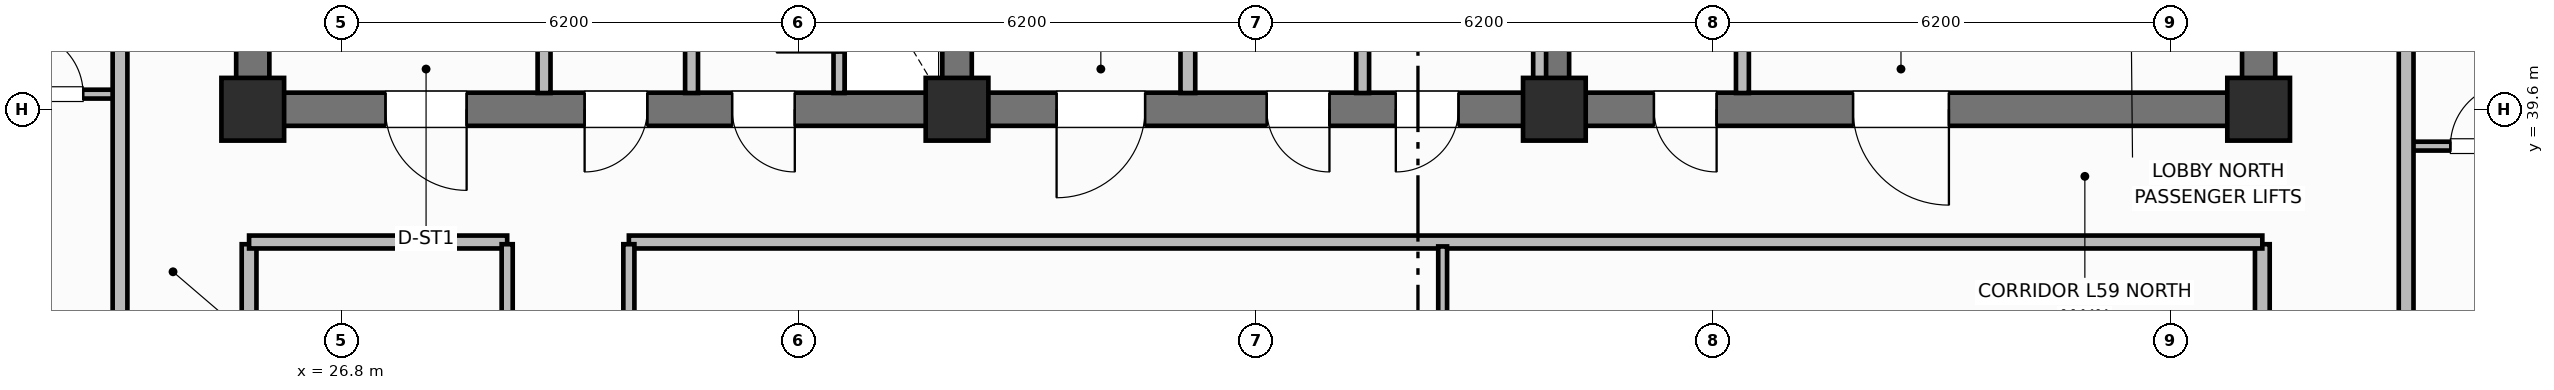
"""IFC4 building model, lengths in metres.
Left out: names, types, materials, properties, quantities, classifications, styles, units other than length and angle.
Written with IfcOpenShell. Run it as: python <this file> out.ifc"""

import sys

from ifc_helpers import new_model, si_unit, direction, frame, frame_2d, origin, origin_2d, place, context, subcontext, project, spatial, rectangle, extrude, element, fill, save


model = new_model("IFC4")
c1 = context("Model", 3, precision=1e-05, world=origin(), true_north=direction((0.0, 1.0)))
c2 = subcontext(c1, "Body", "Model", "MODEL_VIEW")
j1 = project(units=[si_unit("LENGTHUNIT", "METRE"), si_unit("PLANEANGLEUNIT", "RADIAN")], contexts=[c1])
p1 = place(None, origin())
s1 = spatial("IfcSite", under=j1, at=p1, CompositionType="ELEMENT")
p2 = place(p1, origin())
s2 = spatial("IfcBuilding", under=s1, at=p2, CompositionType="ELEMENT")
p3 = place(p2, frame((0.0, 0.0, 236.9)))
s3 = spatial("IfcBuildingStorey", under=s2, at=p3, CompositionType="ELEMENT", Elevation=236.9)
for number, where, z_axis, x_axis in (
    (1, (25.6, 39.825, 0.0), (0.0, 0.0, 1.0), (0.0, 1.0, 0.0)),
    (2, (52.8, 39.825, 0.0), (0.0, 0.0, 1.0), (0.0, 1.0, 0.0)),
):
    element("IfcWall", number, at=place(p3, frame(where, z_axis=z_axis, x_axis=x_axis)), inside=s3, PredefinedType="SHEAR", context=c2, shape_type="SweptSolid", body=[
        extrude(rectangle(XDim=5.75, YDim=0.45, at=frame_2d((2.875, 0.0))), origin(), (0.0, 0.0, 1.0), 3.7),
    ])
p4 = place(p3, frame((52.8, 39.6, 0.0), z_axis=(0.0, 0.0, 1.0), x_axis=(-1.0, 0.0, 0.0)))
e3 = element("IfcWall", 3, at=p4, inside=s3, PredefinedType="SHEAR", context=c2, shape_type="SweptSolid", body=[
    extrude(rectangle(XDim=27.2, YDim=0.45, at=frame_2d((13.6, 0.0))), origin(), (0.0, 0.0, 1.0), 3.7),
])
p5 = place(p4, frame((24.3, 0.0, 0.0)))
e4 = element("IfcOpeningElement", 4, at=p5, cuts=e3, PredefinedType="OPENING", context=c2, shape_type="SweptSolid", body=[
    extrude(rectangle(XDim=1.1, YDim=2.15, at=frame_2d((0.55, 1.075))), frame((0.0, 0.235, 0.0), z_axis=(0.0, -1.0, 0.0), x_axis=(1.0, 0.0, 0.0)), (0.0, 0.0, 1.0), 0.47),
])
p6 = place(p4, frame((21.85, 0.0, 0.0)))
e5 = element("IfcOpeningElement", 5, at=p6, cuts=e3, PredefinedType="OPENING", context=c2, shape_type="SweptSolid", body=[
    extrude(rectangle(XDim=0.85, YDim=2.1, at=frame_2d((0.425, 1.05))), frame((0.0, 0.235, 0.0), z_axis=(0.0, -1.0, 0.0), x_axis=(1.0, 0.0, 0.0)), (0.0, 0.0, 1.0), 0.47),
])
p7 = place(p4, frame((19.85, 0.0, 0.0)))
e6 = element("IfcOpeningElement", 6, at=p7, cuts=e3, PredefinedType="OPENING", context=c2, shape_type="SweptSolid", body=[
    extrude(rectangle(XDim=0.85, YDim=2.1, at=frame_2d((0.425, 1.05))), frame((0.0, 0.235, 0.0), z_axis=(0.0, -1.0, 0.0), x_axis=(1.0, 0.0, 0.0)), (0.0, 0.0, 1.0), 0.47),
])
p8 = place(p4, frame((15.1, 0.0, 0.0)))
e7 = element("IfcOpeningElement", 7, at=p8, cuts=e3, PredefinedType="OPENING", context=c2, shape_type="SweptSolid", body=[
    extrude(rectangle(XDim=1.2, YDim=2.15, at=frame_2d((0.6, 1.075))), frame((0.0, 0.235, 0.0), z_axis=(0.0, -1.0, 0.0), x_axis=(1.0, 0.0, 0.0)), (0.0, 0.0, 1.0), 0.47),
])
p9 = place(p4, frame((12.6, 0.0, 0.0)))
e8 = element("IfcOpeningElement", 8, at=p9, cuts=e3, PredefinedType="OPENING", context=c2, shape_type="SweptSolid", body=[
    extrude(rectangle(XDim=0.85, YDim=2.1, at=frame_2d((0.425, 1.05))), frame((0.0, 0.235, 0.0), z_axis=(0.0, -1.0, 0.0), x_axis=(1.0, 0.0, 0.0)), (0.0, 0.0, 1.0), 0.47),
])
p10 = place(p4, frame((10.85, 0.0, 0.0)))
e9 = element("IfcOpeningElement", 9, at=p10, cuts=e3, PredefinedType="OPENING", context=c2, shape_type="SweptSolid", body=[
    extrude(rectangle(XDim=0.85, YDim=2.1, at=frame_2d((0.425, 1.05))), frame((0.0, 0.235, 0.0), z_axis=(0.0, -1.0, 0.0), x_axis=(1.0, 0.0, 0.0)), (0.0, 0.0, 1.0), 0.47),
])
p11 = place(p4, frame((7.35, 0.0, 0.0)))
e10 = element("IfcOpeningElement", 10, at=p11, cuts=e3, PredefinedType="OPENING", context=c2, shape_type="SweptSolid", body=[
    extrude(rectangle(XDim=0.85, YDim=2.1, at=frame_2d((0.425, 1.05))), frame((0.0, 0.235, 0.0), z_axis=(0.0, -1.0, 0.0), x_axis=(1.0, 0.0, 0.0)), (0.0, 0.0, 1.0), 0.47),
])
p12 = place(p4, frame((4.2, 0.0, 0.0)))
e11 = element("IfcOpeningElement", 11, at=p12, cuts=e3, PredefinedType="OPENING", context=c2, shape_type="SweptSolid", body=[
    extrude(rectangle(XDim=1.3, YDim=2.2, at=frame_2d((0.65, 1.1))), frame((0.0, 0.235, 0.0), z_axis=(0.0, -1.0, 0.0), x_axis=(1.0, 0.0, 0.0)), (0.0, 0.0, 1.0), 0.47),
])
for number, where, z_axis, x_axis in (
    (12, (35.15, 39.825, 0.0), (0.0, 0.0, 1.0), (0.0, 1.0, 0.0)),
    (13, (43.25, 39.825, 0.0), (0.0, 0.0, 1.0), (0.0, 1.0, 0.0)),
):
    element("IfcWall", number, at=place(p3, frame(where, z_axis=z_axis, x_axis=x_axis)), inside=s3, PredefinedType="SHEAR", context=c2, shape_type="SweptSolid", body=[
        extrude(rectangle(XDim=5.75, YDim=0.4, at=frame_2d((2.875, 0.0))), origin(), (0.0, 0.0, 1.0), 3.7),
    ])
for number, where, z_axis, x_axis in (
    (14, (25.6, 39.6, 0.0), (0.0, 0.0, 1.0), (1.0, 0.0, 0.0)),
    (15, (35.15, 39.6, 0.0), (0.0, 0.0, 1.0), (1.0, 0.0, 0.0)),
    (16, (43.25, 39.6, 0.0), (0.0, 0.0, 1.0), (1.0, 0.0, 0.0)),
    (17, (52.8, 39.6, 0.0), (0.0, 0.0, 1.0), (1.0, 0.0, 0.0)),
):
    element("IfcColumn", number, at=place(p3, frame(where, z_axis=z_axis, x_axis=x_axis)), inside=s3, PredefinedType="COLUMN", context=c2, shape_type="SweptSolid", body=[
        extrude(rectangle(XDim=0.85, YDim=0.85, at=origin_2d()), origin(), (0.0, 0.0, 1.0), 3.7),
    ])
p13 = place(p3, frame((33.55, 39.82, 0.0), z_axis=(0.0, 0.0, 1.0), x_axis=(0.0, 1.0, 0.0)))
e18 = element("IfcWall", 18, at=p13, inside=s3, PredefinedType="PARTITIONING", context=c2, shape_type="SweptSolid", body=[
    extrude(rectangle(XDim=2.13, YDim=0.15, at=frame_2d((1.065, 0.0))), origin(), (0.0, 0.0, 1.0), 2.56),
])
p14 = place(p13, frame((0.55, 0.0, 0.0)))
e19 = element("IfcOpeningElement", 19, at=p14, cuts=e18, PredefinedType="OPENING", context=c2, shape_type="SweptSolid", body=[
    extrude(rectangle(XDim=0.85, YDim=2.05, at=frame_2d((0.425, 1.025))), frame((0.0, 0.085, 0.0), z_axis=(0.0, -1.0, 0.0), x_axis=(1.0, 0.0, 0.0)), (0.0, 0.0, 1.0), 0.17),
])
for number, where, z_axis, x_axis in (
    (20, (29.55, 39.82, 0.0), (0.0, 0.0, 1.0), (0.0, 1.0, 0.0)),
    (21, (31.55, 39.82, 0.0), (0.0, 0.0, 1.0), (0.0, 1.0, 0.0)),
):
    element("IfcWall", number, at=place(p3, frame(where, z_axis=z_axis, x_axis=x_axis)), inside=s3, PredefinedType="PARTITIONING", context=c2, shape_type="SweptSolid", body=[
        extrude(rectangle(XDim=2.13, YDim=0.175, at=frame_2d((1.065, 0.0))), origin(), (0.0, 0.0, 1.0), 2.56),
    ])
p15 = place(p3, frame((38.28, 39.82, 0.0), z_axis=(0.0, 0.0, 1.0), x_axis=(0.0, 1.0, 0.0)))
e22 = element("IfcWall", 22, at=p15, inside=s3, PredefinedType="PARTITIONING", context=c2, shape_type="SweptSolid", body=[
    extrude(rectangle(XDim=5.63, YDim=0.2, at=frame_2d((2.815, 0.0))), origin(), (0.0, 0.0, 1.0), 2.56),
])
for number, where, z_axis, x_axis in (
    (23, (43.05, 39.82, 0.0), (0.0, 0.0, 1.0), (0.0, 1.0, 0.0)),
    (24, (40.65, 39.82, 0.0), (0.0, 0.0, 1.0), (0.0, 1.0, 0.0)),
    (25, (45.8, 39.82, 0.0), (0.0, 0.0, 1.0), (0.0, 1.0, 0.0)),
):
    element("IfcWall", number, at=place(p3, frame(where, z_axis=z_axis, x_axis=x_axis)), inside=s3, PredefinedType="PARTITIONING", context=c2, shape_type="SweptSolid", body=[
        extrude(rectangle(XDim=5.63, YDim=0.175, at=frame_2d((2.815, 0.0))), origin(), (0.0, 0.0, 1.0), 2.56),
    ])
for number, where, z_axis, x_axis in (
    (26, (25.55, 18.63, 0.0), (0.0, 0.0, 1.0), (0.0, 1.0, 0.0)),
    (27, (52.85, 18.63, 0.0), (0.0, 0.0, 1.0), (0.0, 1.0, 0.0)),
):
    element("IfcWall", number, at=place(p3, frame(where, z_axis=z_axis, x_axis=x_axis)), inside=s3, PredefinedType="PARTITIONING", context=c2, shape_type="SweptSolid", body=[
        extrude(rectangle(XDim=19.14, YDim=0.2, at=frame_2d((9.57, 0.0))), origin(), (0.0, 0.0, 1.0), 2.56),
    ])
p16 = place(p3, frame((25.55, 37.8, 0.0), z_axis=(0.0, 0.0, 1.0), x_axis=(1.0, 0.0, 0.0)))
e28 = element("IfcWall", 28, at=p16, inside=s3, PredefinedType="PARTITIONING", context=c2, shape_type="SweptSolid", body=[
    extrude(rectangle(XDim=3.5, YDim=0.175, at=frame_2d((1.75, 0.0))), origin(), (0.0, 0.0, 1.0), 2.56),
])
p17 = place(p3, frame((30.7, 37.8, 0.0), z_axis=(0.0, 0.0, 1.0), x_axis=(1.0, 0.0, 0.0)))
e29 = element("IfcWall", 29, at=p17, inside=s3, PredefinedType="PARTITIONING", context=c2, shape_type="SweptSolid", body=[
    extrude(rectangle(XDim=22.15, YDim=0.175, at=frame_2d((11.075, 0.0))), origin(), (0.0, 0.0, 1.0), 2.56),
])
p18 = place(p3, frame((41.735, 29.388, 0.0), z_axis=(0.0, 0.0, 1.0), x_axis=(0.0, 1.0, 0.0)))
e30 = element("IfcWall", 30, at=p18, inside=s3, PredefinedType="PARTITIONING", context=c2, shape_type="SweptSolid", body=[
    extrude(rectangle(XDim=8.352, YDim=0.12, at=frame_2d((4.176, 0.0))), origin(), (0.0, 0.0, 1.0), 2.56),
])
p19 = place(p18, frame((2.0, 0.0, 0.0)))
e31 = element("IfcOpeningElement", 31, at=p19, cuts=e30, PredefinedType="OPENING", context=c2, shape_type="SweptSolid", body=[
    extrude(rectangle(XDim=0.9, YDim=2.1, at=frame_2d((0.45, 1.05))), frame((0.0, 0.07, 0.0), z_axis=(0.0, -1.0, 0.0), x_axis=(1.0, 0.0, 0.0)), (0.0, 0.0, 1.0), 0.14),
])
p20 = place(p3, frame((29.05, 18.63, 0.0), z_axis=(0.0, 0.0, 1.0), x_axis=(0.0, 1.0, 0.0)))
e32 = element("IfcWall", 32, at=p20, inside=s3, PredefinedType="PARTITIONING", context=c2, shape_type="SweptSolid", body=[
    extrude(rectangle(XDim=19.14, YDim=0.15, at=frame_2d((9.57, 0.0))), origin(), (0.0, 0.0, 1.0), 2.56),
])
p21 = place(p20, frame((5.5, 0.0, 0.0)))
e33 = element("IfcOpeningElement", 33, at=p21, cuts=e32, PredefinedType="OPENING", context=c2, shape_type="SweptSolid", body=[
    extrude(rectangle(XDim=1.0, YDim=2.15, at=frame_2d((0.5, 1.075))), frame((0.0, 0.085, 0.0), z_axis=(0.0, -1.0, 0.0), x_axis=(1.0, 0.0, 0.0)), (0.0, 0.0, 1.0), 0.17),
])
p22 = place(p3, frame((30.7, 18.63, 0.0), z_axis=(0.0, 0.0, 1.0), x_axis=(0.0, 1.0, 0.0)))
e34 = element("IfcWall", 34, at=p22, inside=s3, PredefinedType="PARTITIONING", context=c2, shape_type="SweptSolid", body=[
    extrude(rectangle(XDim=19.14, YDim=0.15, at=frame_2d((9.57, 0.0))), origin(), (0.0, 0.0, 1.0), 2.56),
])
p23 = place(p22, frame((2.2, 0.0, 0.0)))
e35 = element("IfcOpeningElement", 35, at=p23, cuts=e34, PredefinedType="OPENING", context=c2, shape_type="SweptSolid", body=[
    extrude(rectangle(XDim=1.0, YDim=2.15, at=frame_2d((0.5, 1.075))), frame((0.0, 0.085, 0.0), z_axis=(0.0, -1.0, 0.0), x_axis=(1.0, 0.0, 0.0)), (0.0, 0.0, 1.0), 0.17),
])
p24 = place(p22, frame((12.719, 0.0, 0.0)))
e36 = element("IfcOpeningElement", 36, at=p24, cuts=e34, PredefinedType="OPENING", context=c2, shape_type="SweptSolid", body=[
    extrude(rectangle(XDim=1.0, YDim=2.15, at=frame_2d((0.5, 1.075))), frame((0.0, 0.085, 0.0), z_axis=(0.0, -1.0, 0.0), x_axis=(1.0, 0.0, 0.0)), (0.0, 0.0, 1.0), 0.17),
])
p25 = place(p3, frame((21.85, 39.805, 0.0), z_axis=(0.0, 0.0, 1.0), x_axis=(1.0, 0.0, 0.0)))
e37 = element("IfcWall", 37, at=p25, inside=s3, PredefinedType="PARTITIONING", context=c2, shape_type="SweptSolid", body=[
    extrude(rectangle(XDim=1.95, YDim=0.12, at=frame_2d((0.975, 0.0))), origin(), (0.0, 0.0, 1.0), 2.56),
])
p26 = place(p25, frame((0.6, 0.0, 0.0)))
e38 = element("IfcOpeningElement", 38, at=p26, cuts=e37, PredefinedType="OPENING", context=c2, shape_type="SweptSolid", body=[
    extrude(rectangle(XDim=0.85, YDim=2.1, at=frame_2d((0.425, 1.05))), frame((0.0, 0.07, 0.0), z_axis=(0.0, -1.0, 0.0), x_axis=(1.0, 0.0, 0.0)), (0.0, 0.0, 1.0), 0.14),
])
p27 = place(p3, frame((23.8, 9.95, 0.0), z_axis=(0.0, 0.0, 1.0), x_axis=(0.0, 1.0, 0.0)))
e39 = element("IfcWall", 39, at=p27, inside=s3, PredefinedType="PARTITIONING", context=c2, shape_type="SweptSolid", body=[
    extrude(rectangle(XDim=36.5, YDim=0.2, at=frame_2d((18.25, 0.0))), origin(), (0.0, 0.0, 1.0), 2.56),
])
p28 = place(p27, frame((3.25, 0.0, 0.0)))
e40 = element("IfcOpeningElement", 40, at=p28, cuts=e39, PredefinedType="OPENING", context=c2, shape_type="SweptSolid", body=[
    extrude(rectangle(XDim=1.0, YDim=2.15, at=frame_2d((0.5, 1.075))), frame((0.0, 0.11, 0.0), z_axis=(0.0, -1.0, 0.0), x_axis=(1.0, 0.0, 0.0)), (0.0, 0.0, 1.0), 0.22),
])
p29 = place(p27, frame((13.3, 0.0, 0.0)))
e41 = element("IfcOpeningElement", 41, at=p29, cuts=e39, PredefinedType="OPENING", context=c2, shape_type="SweptSolid", body=[
    extrude(rectangle(XDim=1.0, YDim=2.15, at=frame_2d((0.5, 1.075))), frame((0.0, 0.11, 0.0), z_axis=(0.0, -1.0, 0.0), x_axis=(1.0, 0.0, 0.0)), (0.0, 0.0, 1.0), 0.22),
])
p30 = place(p27, frame((25.005, 0.0, 0.0)))
e42 = element("IfcOpeningElement", 42, at=p30, cuts=e39, PredefinedType="OPENING", context=c2, shape_type="SweptSolid", body=[
    extrude(rectangle(XDim=1.0, YDim=2.15, at=frame_2d((0.5, 1.075))), frame((0.0, 0.11, 0.0), z_axis=(0.0, -1.0, 0.0), x_axis=(1.0, 0.0, 0.0)), (0.0, 0.0, 1.0), 0.22),
])
p31 = place(p3, frame((54.8, 39.1, 0.0), z_axis=(0.0, 0.0, 1.0), x_axis=(1.0, 0.0, 0.0)))
e43 = element("IfcWall", 43, at=p31, inside=s3, PredefinedType="PARTITIONING", context=c2, shape_type="SweptSolid", body=[
    extrude(rectangle(XDim=1.95, YDim=0.12, at=frame_2d((0.975, 0.0))), origin(), (0.0, 0.0, 1.0), 2.56),
])
p32 = place(p31, frame((0.6, 0.0, 0.0)))
e44 = element("IfcOpeningElement", 44, at=p32, cuts=e43, PredefinedType="OPENING", context=c2, shape_type="SweptSolid", body=[
    extrude(rectangle(XDim=0.85, YDim=2.1, at=frame_2d((0.425, 1.05))), frame((0.0, 0.07, 0.0), z_axis=(0.0, -1.0, 0.0), x_axis=(1.0, 0.0, 0.0)), (0.0, 0.0, 1.0), 0.14),
])
p33 = place(p3, frame((54.8, 9.95, 0.0), z_axis=(0.0, 0.0, 1.0), x_axis=(0.0, 1.0, 0.0)))
e45 = element("IfcWall", 45, at=p33, inside=s3, PredefinedType="PARTITIONING", context=c2, shape_type="SweptSolid", body=[
    extrude(rectangle(XDim=36.5, YDim=0.2, at=frame_2d((18.25, 0.0))), origin(), (0.0, 0.0, 1.0), 2.56),
])
p34 = place(p33, frame((3.25, 0.0, 0.0)))
e46 = element("IfcOpeningElement", 46, at=p34, cuts=e45, PredefinedType="OPENING", context=c2, shape_type="SweptSolid", body=[
    extrude(rectangle(XDim=1.0, YDim=2.15, at=frame_2d((0.5, 1.075))), frame((0.0, 0.11, 0.0), z_axis=(0.0, -1.0, 0.0), x_axis=(1.0, 0.0, 0.0)), (0.0, 0.0, 1.0), 0.22),
])
p35 = place(p33, frame((12.96, 0.0, 0.0)))
e47 = element("IfcOpeningElement", 47, at=p35, cuts=e45, PredefinedType="OPENING", context=c2, shape_type="SweptSolid", body=[
    extrude(rectangle(XDim=1.0, YDim=2.15, at=frame_2d((0.5, 1.075))), frame((0.0, 0.11, 0.0), z_axis=(0.0, -1.0, 0.0), x_axis=(1.0, 0.0, 0.0)), (0.0, 0.0, 1.0), 0.22),
])
p36 = place(p33, frame((24.3, 0.0, 0.0)))
e48 = element("IfcOpeningElement", 48, at=p36, cuts=e45, PredefinedType="OPENING", context=c2, shape_type="SweptSolid", body=[
    extrude(rectangle(XDim=1.0, YDim=2.15, at=frame_2d((0.5, 1.075))), frame((0.0, 0.11, 0.0), z_axis=(0.0, -1.0, 0.0), x_axis=(1.0, 0.0, 0.0)), (0.0, 0.0, 1.0), 0.22),
])
p37 = place(p14, origin())
e49 = element("IfcDoor", 49, at=p37, inside=s3, OperationType="SINGLE_SWING_LEFT", PredefinedType="TRAPDOOR", context=c2, shape_type="SweptSolid", body=[
    extrude(rectangle(XDim=0.85, YDim=2.05, at=frame_2d((0.425, 1.025))), frame((0.0, 0.025, 0.0), z_axis=(0.0, -1.0, 0.0), x_axis=(1.0, 0.0, 0.0)), (0.0, 0.0, 1.0), 0.05),
])
fill(e19, e49)
p38 = place(p26, origin())
e50 = element("IfcDoor", 50, at=p38, inside=s3, OperationType="SINGLE_SWING_LEFT", PredefinedType="DOOR", context=c2, shape_type="SweptSolid", body=[
    extrude(rectangle(XDim=0.85, YDim=2.1, at=frame_2d((0.425, 1.05))), frame((0.0, 0.025, 0.0), z_axis=(0.0, -1.0, 0.0), x_axis=(1.0, 0.0, 0.0)), (0.0, 0.0, 1.0), 0.05),
])
fill(e38, e50)
p39 = place(p32, origin())
e51 = element("IfcDoor", 51, at=p39, inside=s3, OperationType="SINGLE_SWING_RIGHT", PredefinedType="DOOR", context=c2, shape_type="SweptSolid", body=[
    extrude(rectangle(XDim=0.85, YDim=2.1, at=frame_2d((0.425, 1.05))), frame((0.0, 0.025, 0.0), z_axis=(0.0, -1.0, 0.0), x_axis=(1.0, 0.0, 0.0)), (0.0, 0.0, 1.0), 0.05),
])
fill(e44, e51)
p40 = place(p5, origin())
e52 = element("IfcDoor", 52, at=p40, inside=s3, OperationType="SINGLE_SWING_LEFT", PredefinedType="DOOR", context=c2, shape_type="SweptSolid", body=[
    extrude(rectangle(XDim=1.1, YDim=2.15, at=frame_2d((0.55, 1.075))), frame((0.0, 0.025, 0.0), z_axis=(0.0, -1.0, 0.0), x_axis=(1.0, 0.0, 0.0)), (0.0, 0.0, 1.0), 0.05),
])
fill(e4, e52)
p41 = place(p6, origin())
e53 = element("IfcDoor", 53, at=p41, inside=s3, OperationType="SINGLE_SWING_RIGHT", PredefinedType="DOOR", context=c2, shape_type="SweptSolid", body=[
    extrude(rectangle(XDim=0.85, YDim=2.1, at=frame_2d((0.425, 1.05))), frame((0.0, 0.025, 0.0), z_axis=(0.0, -1.0, 0.0), x_axis=(1.0, 0.0, 0.0)), (0.0, 0.0, 1.0), 0.05),
])
fill(e5, e53)
p42 = place(p7, origin())
e54 = element("IfcDoor", 54, at=p42, inside=s3, OperationType="SINGLE_SWING_LEFT", PredefinedType="DOOR", context=c2, shape_type="SweptSolid", body=[
    extrude(rectangle(XDim=0.85, YDim=2.1, at=frame_2d((0.425, 1.05))), frame((0.0, 0.025, 0.0), z_axis=(0.0, -1.0, 0.0), x_axis=(1.0, 0.0, 0.0)), (0.0, 0.0, 1.0), 0.05),
])
fill(e6, e54)
p43 = place(p8, origin())
e55 = element("IfcDoor", 55, at=p43, inside=s3, OperationType="SINGLE_SWING_RIGHT", PredefinedType="DOOR", context=c2, shape_type="SweptSolid", body=[
    extrude(rectangle(XDim=1.2, YDim=2.15, at=frame_2d((0.6, 1.075))), frame((0.0, 0.025, 0.0), z_axis=(0.0, -1.0, 0.0), x_axis=(1.0, 0.0, 0.0)), (0.0, 0.0, 1.0), 0.05),
])
fill(e7, e55)
p44 = place(p9, origin())
e56 = element("IfcDoor", 56, at=p44, inside=s3, OperationType="SINGLE_SWING_LEFT", PredefinedType="DOOR", context=c2, shape_type="SweptSolid", body=[
    extrude(rectangle(XDim=0.85, YDim=2.1, at=frame_2d((0.425, 1.05))), frame((0.0, 0.025, 0.0), z_axis=(0.0, -1.0, 0.0), x_axis=(1.0, 0.0, 0.0)), (0.0, 0.0, 1.0), 0.05),
])
fill(e8, e56)
p45 = place(p10, origin())
e57 = element("IfcDoor", 57, at=p45, inside=s3, OperationType="SINGLE_SWING_RIGHT", PredefinedType="DOOR", context=c2, shape_type="SweptSolid", body=[
    extrude(rectangle(XDim=0.85, YDim=2.1, at=frame_2d((0.425, 1.05))), frame((0.0, 0.025, 0.0), z_axis=(0.0, -1.0, 0.0), x_axis=(1.0, 0.0, 0.0)), (0.0, 0.0, 1.0), 0.05),
])
fill(e9, e57)
p46 = place(p11, origin())
e58 = element("IfcDoor", 58, at=p46, inside=s3, OperationType="SINGLE_SWING_LEFT", PredefinedType="DOOR", context=c2, shape_type="SweptSolid", body=[
    extrude(rectangle(XDim=0.85, YDim=2.1, at=frame_2d((0.425, 1.05))), frame((0.0, 0.025, 0.0), z_axis=(0.0, -1.0, 0.0), x_axis=(1.0, 0.0, 0.0)), (0.0, 0.0, 1.0), 0.05),
])
fill(e10, e58)
p47 = place(p12, origin())
e59 = element("IfcDoor", 59, at=p47, inside=s3, OperationType="SINGLE_SWING_LEFT", PredefinedType="DOOR", context=c2, shape_type="SweptSolid", body=[
    extrude(rectangle(XDim=1.3, YDim=2.2, at=frame_2d((0.65, 1.1))), frame((0.0, 0.025, 0.0), z_axis=(0.0, -1.0, 0.0), x_axis=(1.0, 0.0, 0.0)), (0.0, 0.0, 1.0), 0.05),
])
fill(e11, e59)
save(model, sys.argv[1])
